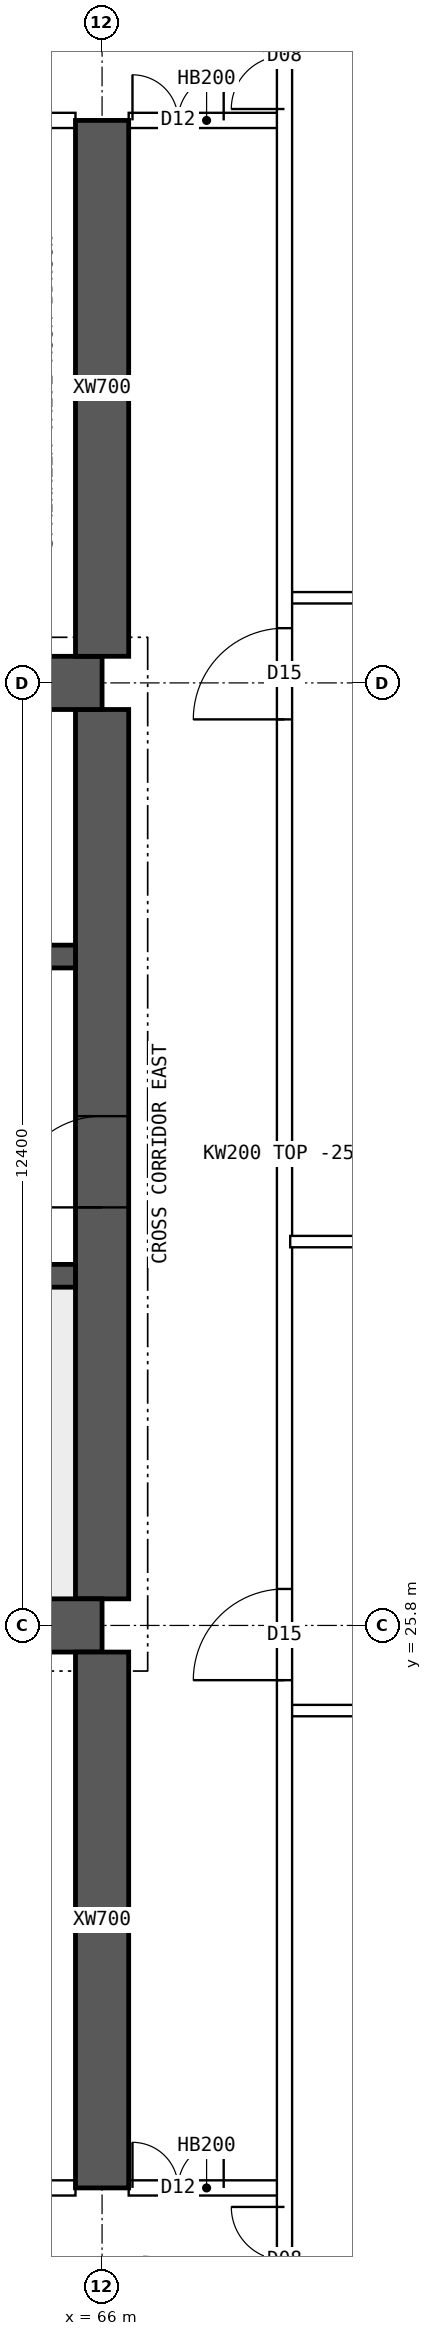
"""IFC4 building model, lengths in metres.
Left out: names, types, materials, properties, quantities, classifications, styles, units other than length and angle.
Written with IfcOpenShell. Run it as: python <this file> out.ifc"""

import sys

from ifc_helpers import new_model, si_unit, direction, frame, frame_2d, origin, place, context, subcontext, project, spatial, polyline, rectangle, outline, extrude, element, fill, save


model = new_model("IFC4")
c1 = context("Model", 3, precision=1e-05, world=origin(), true_north=direction((0.0, 1.0)))
c2 = subcontext(c1, "Body", "Model", "MODEL_VIEW")
j1 = project(units=[si_unit("LENGTHUNIT", "METRE"), si_unit("PLANEANGLEUNIT", "RADIAN")], contexts=[c1])
p1 = place(None, origin())
s1 = spatial("IfcSite", under=j1, at=p1, CompositionType="ELEMENT")
p2 = place(p1, origin())
s2 = spatial("IfcBuilding", under=s1, at=p2, CompositionType="ELEMENT")
p3 = place(p2, frame((0.0, 0.0, 216.55)))
s3 = spatial("IfcBuildingStorey", under=s2, at=p3, CompositionType="ELEMENT", Elevation=216.55)
for number, where, z_axis, x_axis in (
    (1, (18.0, 25.8, 0.0), (0.0, 0.0, 1.0), (1.0, 0.0, 0.0)),
    (2, (18.0, 38.2, 0.0), (0.0, 0.0, 1.0), (1.0, 0.0, 0.0)),
):
    element("IfcWall", number, at=place(p3, frame(where, z_axis=z_axis, x_axis=x_axis)), inside=s3, PredefinedType="SHEAR", context=c2, shape_type="SweptSolid", body=[
        extrude(rectangle(XDim=48.0, YDim=0.7, at=frame_2d((24.0, 0.0))), origin(), (0.0, 0.0, 1.0), 3.75),
    ])
p4 = place(p3, frame((66.0, 26.15, 0.0), z_axis=(0.0, 0.0, 1.0), x_axis=(0.0, 1.0, 0.0)))
e3 = element("IfcWall", 3, at=p4, inside=s3, PredefinedType="SHEAR", context=c2, shape_type="SweptSolid", body=[
    extrude(rectangle(XDim=11.7, YDim=0.7, at=frame_2d((5.85, 0.0))), origin(), (0.0, 0.0, 1.0), 3.75),
])
p5 = place(p4, frame((5.15, 0.0, 0.0)))
e4 = element("IfcOpeningElement", 4, at=p5, cuts=e3, PredefinedType="OPENING", context=c2, shape_type="SweptSolid", body=[
    extrude(rectangle(XDim=1.2, YDim=2.1, at=frame_2d((0.6, 1.05))), frame((0.0, 0.36, 0.0), z_axis=(0.0, -1.0, 0.0), x_axis=(1.0, 0.0, 0.0)), (0.0, 0.0, 1.0), 0.72),
])
p6 = place(p3, frame((18.35, 30.4, 0.0), z_axis=(0.0, 0.0, 1.0), x_axis=(1.0, 0.0, 0.0)))
e5 = element("IfcWall", 5, at=p6, inside=s3, PredefinedType="SHEAR", context=c2, shape_type="SweptSolid", body=[
    extrude(rectangle(XDim=47.3, YDim=0.3, at=frame_2d((23.65, 0.0))), origin(), (0.0, 0.0, 1.0), 3.75),
])
p7 = place(p6, frame((0.4, 0.0, 0.0)))
e6 = element("IfcOpeningElement", 6, at=p7, cuts=e5, PredefinedType="OPENING", context=c2, shape_type="SweptSolid", body=[
    extrude(rectangle(XDim=1.0, YDim=2.1, at=frame_2d((0.5, 1.05))), frame((0.0, 0.16, 0.0), z_axis=(0.0, -1.0, 0.0), x_axis=(1.0, 0.0, 0.0)), (0.0, 0.0, 1.0), 0.32),
])
p8 = place(p6, frame((45.9, 0.0, 0.0)))
e7 = element("IfcOpeningElement", 7, at=p8, cuts=e5, PredefinedType="OPENING", context=c2, shape_type="SweptSolid", body=[
    extrude(rectangle(XDim=1.0, YDim=2.1, at=frame_2d((0.5, 1.05))), frame((0.0, 0.16, 0.0), z_axis=(0.0, -1.0, 0.0), x_axis=(1.0, 0.0, 0.0)), (0.0, 0.0, 1.0), 0.32),
])
p9 = place(p6, frame((8.4, 0.0, 0.0)))
e8 = element("IfcOpeningElement", 8, at=p9, cuts=e5, PredefinedType="OPENING", context=c2, shape_type="SweptSolid", body=[
    extrude(rectangle(XDim=1.1, YDim=2.1, at=frame_2d((0.55, 1.05))), frame((0.0, 0.16, 0.0), z_axis=(0.0, -1.0, 0.0), x_axis=(1.0, 0.0, 0.0)), (0.0, 0.0, 1.0), 0.32),
])
p10 = place(p6, frame((11.0, 0.0, 0.0)))
e9 = element("IfcOpeningElement", 9, at=p10, cuts=e5, PredefinedType="OPENING", context=c2, shape_type="SweptSolid", body=[
    extrude(rectangle(XDim=1.1, YDim=2.1, at=frame_2d((0.55, 1.05))), frame((0.0, 0.16, 0.0), z_axis=(0.0, -1.0, 0.0), x_axis=(1.0, 0.0, 0.0)), (0.0, 0.0, 1.0), 0.32),
])
p11 = place(p6, frame((13.6, 0.0, 0.0)))
e10 = element("IfcOpeningElement", 10, at=p11, cuts=e5, PredefinedType="OPENING", context=c2, shape_type="SweptSolid", body=[
    extrude(rectangle(XDim=1.1, YDim=2.1, at=frame_2d((0.55, 1.05))), frame((0.0, 0.16, 0.0), z_axis=(0.0, -1.0, 0.0), x_axis=(1.0, 0.0, 0.0)), (0.0, 0.0, 1.0), 0.32),
])
p12 = place(p6, frame((16.2, 0.0, 0.0)))
e11 = element("IfcOpeningElement", 11, at=p12, cuts=e5, PredefinedType="OPENING", context=c2, shape_type="SweptSolid", body=[
    extrude(rectangle(XDim=1.1, YDim=2.1, at=frame_2d((0.55, 1.05))), frame((0.0, 0.16, 0.0), z_axis=(0.0, -1.0, 0.0), x_axis=(1.0, 0.0, 0.0)), (0.0, 0.0, 1.0), 0.32),
])
p13 = place(p6, frame((18.975, 0.0, 0.0)))
e12 = element("IfcOpeningElement", 12, at=p13, cuts=e5, PredefinedType="OPENING", context=c2, shape_type="SweptSolid", body=[
    extrude(rectangle(XDim=0.9, YDim=2.1, at=frame_2d((0.45, 1.05))), frame((0.0, 0.16, 0.0), z_axis=(0.0, -1.0, 0.0), x_axis=(1.0, 0.0, 0.0)), (0.0, 0.0, 1.0), 0.32),
])
p14 = place(p6, frame((24.475, 0.0, 0.0)))
e13 = element("IfcOpeningElement", 13, at=p14, cuts=e5, PredefinedType="OPENING", context=c2, shape_type="SweptSolid", body=[
    extrude(rectangle(XDim=0.9, YDim=2.1, at=frame_2d((0.45, 1.05))), frame((0.0, 0.16, 0.0), z_axis=(0.0, -1.0, 0.0), x_axis=(1.0, 0.0, 0.0)), (0.0, 0.0, 1.0), 0.32),
])
p15 = place(p6, frame((30.267, 0.0, 0.0)))
e14 = element("IfcOpeningElement", 14, at=p15, cuts=e5, PredefinedType="OPENING", context=c2, shape_type="SweptSolid", body=[
    extrude(rectangle(XDim=1.1, YDim=2.1, at=frame_2d((0.55, 1.05))), frame((0.0, 0.16, 0.0), z_axis=(0.0, -1.0, 0.0), x_axis=(1.0, 0.0, 0.0)), (0.0, 0.0, 1.0), 0.32),
])
p16 = place(p6, frame((33.8, 0.0, 0.0)))
e15 = element("IfcOpeningElement", 15, at=p16, cuts=e5, PredefinedType="OPENING", context=c2, shape_type="SweptSolid", body=[
    extrude(rectangle(XDim=1.1, YDim=2.1, at=frame_2d((0.55, 1.05))), frame((0.0, 0.16, 0.0), z_axis=(0.0, -1.0, 0.0), x_axis=(1.0, 0.0, 0.0)), (0.0, 0.0, 1.0), 0.32),
])
p17 = place(p6, frame((37.333, 0.0, 0.0)))
e16 = element("IfcOpeningElement", 16, at=p17, cuts=e5, PredefinedType="OPENING", context=c2, shape_type="SweptSolid", body=[
    extrude(rectangle(XDim=1.1, YDim=2.1, at=frame_2d((0.55, 1.05))), frame((0.0, 0.16, 0.0), z_axis=(0.0, -1.0, 0.0), x_axis=(1.0, 0.0, 0.0)), (0.0, 0.0, 1.0), 0.32),
])
p18 = place(p3, frame((18.35, 34.6, 0.0), z_axis=(0.0, 0.0, 1.0), x_axis=(1.0, 0.0, 0.0)))
e17 = element("IfcWall", 17, at=p18, inside=s3, PredefinedType="SHEAR", context=c2, shape_type="SweptSolid", body=[
    extrude(rectangle(XDim=47.3, YDim=0.3, at=frame_2d((23.65, 0.0))), origin(), (0.0, 0.0, 1.0), 3.75),
])
p19 = place(p18, frame((0.9, 0.0, 0.0)))
e18 = element("IfcOpeningElement", 18, at=p19, cuts=e17, PredefinedType="OPENING", context=c2, shape_type="SweptSolid", body=[
    extrude(rectangle(XDim=1.1, YDim=2.1, at=frame_2d((0.55, 1.05))), frame((0.0, 0.16, 0.0), z_axis=(0.0, -1.0, 0.0), x_axis=(1.0, 0.0, 0.0)), (0.0, 0.0, 1.0), 0.32),
])
p20 = place(p18, frame((45.3, 0.0, 0.0)))
e19 = element("IfcOpeningElement", 19, at=p20, cuts=e17, PredefinedType="OPENING", context=c2, shape_type="SweptSolid", body=[
    extrude(rectangle(XDim=1.1, YDim=2.1, at=frame_2d((0.55, 1.05))), frame((0.0, 0.16, 0.0), z_axis=(0.0, -1.0, 0.0), x_axis=(1.0, 0.0, 0.0)), (0.0, 0.0, 1.0), 0.32),
])
p21 = place(p18, frame((4.25, 0.0, 0.0)))
e20 = element("IfcOpeningElement", 20, at=p21, cuts=e17, PredefinedType="OPENING", context=c2, shape_type="SweptSolid", body=[
    extrude(rectangle(XDim=0.9, YDim=2.1, at=frame_2d((0.45, 1.05))), frame((0.0, 0.16, 0.0), z_axis=(0.0, -1.0, 0.0), x_axis=(1.0, 0.0, 0.0)), (0.0, 0.0, 1.0), 0.32),
])
p22 = place(p18, frame((42.15, 0.0, 0.0)))
e21 = element("IfcOpeningElement", 21, at=p22, cuts=e17, PredefinedType="OPENING", context=c2, shape_type="SweptSolid", body=[
    extrude(rectangle(XDim=0.9, YDim=2.1, at=frame_2d((0.45, 1.05))), frame((0.0, 0.16, 0.0), z_axis=(0.0, -1.0, 0.0), x_axis=(1.0, 0.0, 0.0)), (0.0, 0.0, 1.0), 0.32),
])
p23 = place(p18, frame((9.025, 0.0, 0.0)))
e22 = element("IfcOpeningElement", 22, at=p23, cuts=e17, PredefinedType="OPENING", context=c2, shape_type="SweptSolid", body=[
    extrude(rectangle(XDim=0.9, YDim=2.1, at=frame_2d((0.45, 1.05))), frame((0.0, 0.16, 0.0), z_axis=(0.0, -1.0, 0.0), x_axis=(1.0, 0.0, 0.0)), (0.0, 0.0, 1.0), 0.32),
])
p24 = place(p18, frame((12.999, 0.0, 0.0)))
e23 = element("IfcOpeningElement", 23, at=p24, cuts=e17, PredefinedType="OPENING", context=c2, shape_type="SweptSolid", body=[
    extrude(rectangle(XDim=0.9, YDim=2.1, at=frame_2d((0.45, 1.05))), frame((0.0, 0.16, 0.0), z_axis=(0.0, -1.0, 0.0), x_axis=(1.0, 0.0, 0.0)), (0.0, 0.0, 1.0), 0.32),
])
p25 = place(p18, frame((16.646, 0.0, 0.0)))
e24 = element("IfcOpeningElement", 24, at=p25, cuts=e17, PredefinedType="OPENING", context=c2, shape_type="SweptSolid", body=[
    extrude(rectangle(XDim=0.9, YDim=2.1, at=frame_2d((0.45, 1.05))), frame((0.0, 0.16, 0.0), z_axis=(0.0, -1.0, 0.0), x_axis=(1.0, 0.0, 0.0)), (0.0, 0.0, 1.0), 0.32),
])
p26 = place(p18, frame((20.405, 0.0, 0.0)))
e25 = element("IfcOpeningElement", 25, at=p26, cuts=e17, PredefinedType="OPENING", context=c2, shape_type="SweptSolid", body=[
    extrude(rectangle(XDim=0.9, YDim=2.1, at=frame_2d((0.45, 1.05))), frame((0.0, 0.16, 0.0), z_axis=(0.0, -1.0, 0.0), x_axis=(1.0, 0.0, 0.0)), (0.0, 0.0, 1.0), 0.32),
])
p27 = place(p18, frame((24.811, 0.0, 0.0)))
e26 = element("IfcOpeningElement", 26, at=p27, cuts=e17, PredefinedType="OPENING", context=c2, shape_type="SweptSolid", body=[
    extrude(rectangle(XDim=0.9, YDim=2.1, at=frame_2d((0.45, 1.05))), frame((0.0, 0.16, 0.0), z_axis=(0.0, -1.0, 0.0), x_axis=(1.0, 0.0, 0.0)), (0.0, 0.0, 1.0), 0.32),
])
p28 = place(p18, frame((27.608, 0.0, 0.0)))
e27 = element("IfcOpeningElement", 27, at=p28, cuts=e17, PredefinedType="OPENING", context=c2, shape_type="SweptSolid", body=[
    extrude(rectangle(XDim=0.9, YDim=2.1, at=frame_2d((0.45, 1.05))), frame((0.0, 0.16, 0.0), z_axis=(0.0, -1.0, 0.0), x_axis=(1.0, 0.0, 0.0)), (0.0, 0.0, 1.0), 0.32),
])
p29 = place(p18, frame((29.981, 0.0, 0.0)))
e28 = element("IfcOpeningElement", 28, at=p29, cuts=e17, PredefinedType="OPENING", context=c2, shape_type="SweptSolid", body=[
    extrude(rectangle(XDim=0.9, YDim=2.1, at=frame_2d((0.45, 1.05))), frame((0.0, 0.16, 0.0), z_axis=(0.0, -1.0, 0.0), x_axis=(1.0, 0.0, 0.0)), (0.0, 0.0, 1.0), 0.32),
])
p30 = place(p18, frame((33.831, 0.0, 0.0)))
e29 = element("IfcOpeningElement", 29, at=p30, cuts=e17, PredefinedType="OPENING", context=c2, shape_type="SweptSolid", body=[
    extrude(rectangle(XDim=0.9, YDim=2.1, at=frame_2d((0.45, 1.05))), frame((0.0, 0.16, 0.0), z_axis=(0.0, -1.0, 0.0), x_axis=(1.0, 0.0, 0.0)), (0.0, 0.0, 1.0), 0.32),
])
p31 = place(p18, frame((37.579, 0.0, 0.0)))
e30 = element("IfcOpeningElement", 30, at=p31, cuts=e17, PredefinedType="OPENING", context=c2, shape_type="SweptSolid", body=[
    extrude(rectangle(XDim=0.9, YDim=2.1, at=frame_2d((0.45, 1.05))), frame((0.0, 0.16, 0.0), z_axis=(0.0, -1.0, 0.0), x_axis=(1.0, 0.0, 0.0)), (0.0, 0.0, 1.0), 0.32),
])
for number, where, z_axis, x_axis in (
    (31, (66.0, 18.4, 0.0), (0.0, 0.0, 1.0), (0.0, 1.0, 0.0)),
    (32, (66.0, 38.55, 0.0), (0.0, 0.0, 1.0), (0.0, 1.0, 0.0)),
):
    element("IfcWall", number, at=place(p3, frame(where, z_axis=z_axis, x_axis=x_axis)), inside=s3, PredefinedType="SHEAR", context=c2, shape_type="SweptSolid", body=[
        extrude(rectangle(XDim=7.05, YDim=0.7, at=frame_2d((3.525, 0.0))), origin(), (0.0, 0.0, 1.0), 3.75),
    ])
p32 = place(p3, frame((60.35, 18.4, 0.0), z_axis=(0.0, 0.0, 1.0), x_axis=(1.0, 0.0, 0.0)))
e33 = element("IfcWall", 33, at=p32, inside=s3, PredefinedType="SOLIDWALL", context=c2, shape_type="SweptSolid", body=[
    extrude(rectangle(XDim=5.3, YDim=0.2, at=frame_2d((2.65, 0.0))), origin(), (0.0, 0.0, 1.0), 3.5),
])
p33 = place(p32, frame((0.15, 0.0, 0.0)))
e34 = element("IfcOpeningElement", 34, at=p33, cuts=e33, PredefinedType="OPENING", context=c2, shape_type="SweptSolid", body=[
    extrude(rectangle(XDim=0.9, YDim=2.1, at=frame_2d((0.45, 1.05))), frame((0.0, 0.11, 0.0), z_axis=(0.0, -1.0, 0.0), x_axis=(1.0, 0.0, 0.0)), (0.0, 0.0, 1.0), 0.22),
])
p34 = place(p32, frame((2.17, 0.0, 0.0)))
e35 = element("IfcOpeningElement", 35, at=p34, cuts=e33, PredefinedType="OPENING", context=c2, shape_type="SweptSolid", body=[
    extrude(rectangle(XDim=0.9, YDim=2.1, at=frame_2d((0.45, 1.05))), frame((0.0, 0.11, 0.0), z_axis=(0.0, -1.0, 0.0), x_axis=(1.0, 0.0, 0.0)), (0.0, 0.0, 1.0), 0.22),
])
p35 = place(p3, frame((66.35, 18.4, 0.0), z_axis=(0.0, 0.0, 1.0), x_axis=(1.0, 0.0, 0.0)))
e36 = element("IfcWall", 36, at=p35, inside=s3, PredefinedType="SOLIDWALL", context=c2, shape_type="SweptSolid", body=[
    extrude(rectangle(XDim=2.05, YDim=0.2, at=frame_2d((1.025, 0.0))), origin(), (0.0, 0.0, 1.0), 3.5),
])
p36 = place(p35, frame((0.05, 0.0, 0.0)))
e37 = element("IfcOpeningElement", 37, at=p36, cuts=e36, PredefinedType="OPENING", context=c2, shape_type="SweptSolid", body=[
    extrude(rectangle(XDim=1.2, YDim=2.1, at=frame_2d((0.6, 1.05))), frame((0.0, 0.11, 0.0), z_axis=(0.0, -1.0, 0.0), x_axis=(1.0, 0.0, 0.0)), (0.0, 0.0, 1.0), 0.22),
])
p37 = place(p3, frame((60.35, 45.6, 0.0), z_axis=(0.0, 0.0, 1.0), x_axis=(1.0, 0.0, 0.0)))
e38 = element("IfcWall", 38, at=p37, inside=s3, PredefinedType="SOLIDWALL", context=c2, shape_type="SweptSolid", body=[
    extrude(rectangle(XDim=5.3, YDim=0.2, at=frame_2d((2.65, 0.0))), origin(), (0.0, 0.0, 1.0), 3.5),
])
p38 = place(p37, frame((0.15, 0.0, 0.0)))
e39 = element("IfcOpeningElement", 39, at=p38, cuts=e38, PredefinedType="OPENING", context=c2, shape_type="SweptSolid", body=[
    extrude(rectangle(XDim=0.9, YDim=2.1, at=frame_2d((0.45, 1.05))), frame((0.0, 0.11, 0.0), z_axis=(0.0, -1.0, 0.0), x_axis=(1.0, 0.0, 0.0)), (0.0, 0.0, 1.0), 0.22),
])
p39 = place(p37, frame((3.815, 0.0, 0.0)))
e40 = element("IfcOpeningElement", 40, at=p39, cuts=e38, PredefinedType="OPENING", context=c2, shape_type="SweptSolid", body=[
    extrude(rectangle(XDim=0.9, YDim=2.1, at=frame_2d((0.45, 1.05))), frame((0.0, 0.11, 0.0), z_axis=(0.0, -1.0, 0.0), x_axis=(1.0, 0.0, 0.0)), (0.0, 0.0, 1.0), 0.22),
])
p40 = place(p3, frame((66.35, 45.6, 0.0), z_axis=(0.0, 0.0, 1.0), x_axis=(1.0, 0.0, 0.0)))
e41 = element("IfcWall", 41, at=p40, inside=s3, PredefinedType="SOLIDWALL", context=c2, shape_type="SweptSolid", body=[
    extrude(rectangle(XDim=2.05, YDim=0.2, at=frame_2d((1.025, 0.0))), origin(), (0.0, 0.0, 1.0), 3.5),
])
p41 = place(p40, frame((0.05, 0.0, 0.0)))
e42 = element("IfcOpeningElement", 42, at=p41, cuts=e41, PredefinedType="OPENING", context=c2, shape_type="SweptSolid", body=[
    extrude(rectangle(XDim=1.2, YDim=2.1, at=frame_2d((0.6, 1.05))), frame((0.0, 0.11, 0.0), z_axis=(0.0, -1.0, 0.0), x_axis=(1.0, 0.0, 0.0)), (0.0, 0.0, 1.0), 0.22),
])
p42 = place(p3, frame((68.475, 30.85, 0.0), z_axis=(0.0, 0.0, 1.0), x_axis=(1.0, 0.0, 0.0)))
e43 = element("IfcWall", 43, at=p42, inside=s3, PredefinedType="PARTITIONING", context=c2, shape_type="SweptSolid", body=[
    extrude(outline(polyline([(0.0, 0.0), (6.82, 0.0), (6.82, 3.5), (3.827, 3.5), (3.825, 3.05), (3.227, 3.05), (3.225, 3.5), (0.0, 3.5), (0.0, 0.0)])), frame((0.0, 0.075, 0.0), z_axis=(0.0, -1.0, 0.0), x_axis=(1.0, 0.0, 0.0)), (0.0, 0.0, 1.0), 0.15),
])
p43 = place(p3, frame((68.4, 11.646, 0.0), z_axis=(0.0, 0.0, 1.0), x_axis=(0.0, 1.0, 0.0)))
e44 = element("IfcWall", 44, at=p43, inside=s3, PredefinedType="SOLIDWALL", context=c2, shape_type="SweptSolid", body=[
    extrude(rectangle(XDim=40.708, YDim=0.2, at=frame_2d((20.354, 0.0))), origin(), (0.0, 0.0, 1.0), 3.5),
])
p44 = place(p43, frame((13.434, 0.0, 0.0)))
e45 = element("IfcOpeningElement", 45, at=p44, cuts=e44, PredefinedType="OPENING", context=c2, shape_type="SweptSolid", body=[
    extrude(rectangle(XDim=1.2, YDim=2.1, at=frame_2d((0.6, 1.05))), frame((0.0, 0.11, 0.0), z_axis=(0.0, -1.0, 0.0), x_axis=(1.0, 0.0, 0.0)), (0.0, 0.0, 1.0), 0.22),
])
p45 = place(p43, frame((26.074, 0.0, 0.0)))
e46 = element("IfcOpeningElement", 46, at=p45, cuts=e44, PredefinedType="OPENING", context=c2, shape_type="SweptSolid", body=[
    extrude(rectangle(XDim=1.2, YDim=2.1, at=frame_2d((0.6, 1.05))), frame((0.0, 0.11, 0.0), z_axis=(0.0, -1.0, 0.0), x_axis=(1.0, 0.0, 0.0)), (0.0, 0.0, 1.0), 0.22),
])
p46 = place(p43, frame((5.104, 0.0, 0.0)))
e47 = element("IfcOpeningElement", 47, at=p46, cuts=e44, PredefinedType="OPENING", context=c2, shape_type="SweptSolid", body=[
    extrude(rectangle(XDim=1.4, YDim=2.1, at=frame_2d((0.7, 1.05))), frame((0.0, 0.11, 0.0), z_axis=(0.0, -1.0, 0.0), x_axis=(1.0, 0.0, 0.0)), (0.0, 0.0, 1.0), 0.22),
])
p47 = place(p43, frame((34.104, 0.0, 0.0)))
e48 = element("IfcOpeningElement", 48, at=p47, cuts=e44, PredefinedType="OPENING", context=c2, shape_type="SweptSolid", body=[
    extrude(rectangle(XDim=1.4, YDim=2.1, at=frame_2d((0.7, 1.05))), frame((0.0, 0.11, 0.0), z_axis=(0.0, -1.0, 0.0), x_axis=(1.0, 0.0, 0.0)), (0.0, 0.0, 1.0), 0.22),
])
for number, where, z_axis, x_axis in (
    (49, (68.475, 24.68, 0.0), (0.0, 0.0, 1.0), (1.0, 0.0, 0.0)),
    (50, (68.475, 39.32, 0.0), (0.0, 0.0, 1.0), (1.0, 0.0, 0.0)),
):
    element("IfcWall", number, at=place(p3, frame(where, z_axis=z_axis, x_axis=x_axis)), inside=s3, PredefinedType="PARTITIONING", context=c2, shape_type="SweptSolid", body=[
        extrude(rectangle(XDim=6.82, YDim=0.15, at=frame_2d((3.41, 0.0))), origin(), (0.0, 0.0, 1.0), 3.5),
    ])
p48 = place(p5, origin())
e51 = element("IfcDoor", 51, at=p48, inside=s3, OperationType="SINGLE_SWING_LEFT", PredefinedType="DOOR", context=c2, shape_type="SweptSolid", body=[
    extrude(rectangle(XDim=1.2, YDim=2.1, at=frame_2d((0.6, 1.05))), frame((0.0, 0.025, 0.0), z_axis=(0.0, -1.0, 0.0), x_axis=(1.0, 0.0, 0.0)), (0.0, 0.0, 1.0), 0.05),
])
fill(e4, e51)
p49 = place(p36, origin())
e52 = element("IfcDoor", 52, at=p49, inside=s3, OperationType="DOUBLE_DOOR_SINGLE_SWING", PredefinedType="DOOR", context=c2, shape_type="SweptSolid", body=[
    extrude(rectangle(XDim=1.2, YDim=2.1, at=frame_2d((0.6, 1.05))), frame((0.0, 0.025, 0.0), z_axis=(0.0, -1.0, 0.0), x_axis=(1.0, 0.0, 0.0)), (0.0, 0.0, 1.0), 0.05),
])
fill(e37, e52)
p50 = place(p41, origin())
e53 = element("IfcDoor", 53, at=p50, inside=s3, OperationType="DOUBLE_DOOR_SINGLE_SWING", PredefinedType="DOOR", context=c2, shape_type="SweptSolid", body=[
    extrude(rectangle(XDim=1.2, YDim=2.1, at=frame_2d((0.6, 1.05))), frame((0.0, 0.025, 0.0), z_axis=(0.0, -1.0, 0.0), x_axis=(1.0, 0.0, 0.0)), (0.0, 0.0, 1.0), 0.05),
])
fill(e42, e53)
p51 = place(p44, origin())
e54 = element("IfcDoor", 54, at=p51, inside=s3, OperationType="SINGLE_SWING_LEFT", PredefinedType="DOOR", context=c2, shape_type="SweptSolid", body=[
    extrude(rectangle(XDim=1.2, YDim=2.1, at=frame_2d((0.6, 1.05))), frame((0.0, 0.025, 0.0), z_axis=(0.0, -1.0, 0.0), x_axis=(1.0, 0.0, 0.0)), (0.0, 0.0, 1.0), 0.05),
])
fill(e45, e54)
p52 = place(p45, origin())
e55 = element("IfcDoor", 55, at=p52, inside=s3, OperationType="SINGLE_SWING_LEFT", PredefinedType="DOOR", context=c2, shape_type="SweptSolid", body=[
    extrude(rectangle(XDim=1.2, YDim=2.1, at=frame_2d((0.6, 1.05))), frame((0.0, 0.025, 0.0), z_axis=(0.0, -1.0, 0.0), x_axis=(1.0, 0.0, 0.0)), (0.0, 0.0, 1.0), 0.05),
])
fill(e46, e55)
p53 = place(p46, origin())
e56 = element("IfcDoor", 56, at=p53, inside=s3, OperationType="DOUBLE_DOOR_SINGLE_SWING", PredefinedType="DOOR", context=c2, shape_type="SweptSolid", body=[
    extrude(rectangle(XDim=1.4, YDim=2.1, at=frame_2d((0.7, 1.05))), frame((0.0, 0.025, 0.0), z_axis=(0.0, -1.0, 0.0), x_axis=(1.0, 0.0, 0.0)), (0.0, 0.0, 1.0), 0.05),
])
fill(e47, e56)
p54 = place(p47, origin())
e57 = element("IfcDoor", 57, at=p54, inside=s3, OperationType="DOUBLE_DOOR_SINGLE_SWING", PredefinedType="DOOR", context=c2, shape_type="SweptSolid", body=[
    extrude(rectangle(XDim=1.4, YDim=2.1, at=frame_2d((0.7, 1.05))), frame((0.0, 0.025, 0.0), z_axis=(0.0, -1.0, 0.0), x_axis=(1.0, 0.0, 0.0)), (0.0, 0.0, 1.0), 0.05),
])
fill(e48, e57)
save(model, sys.argv[1])
